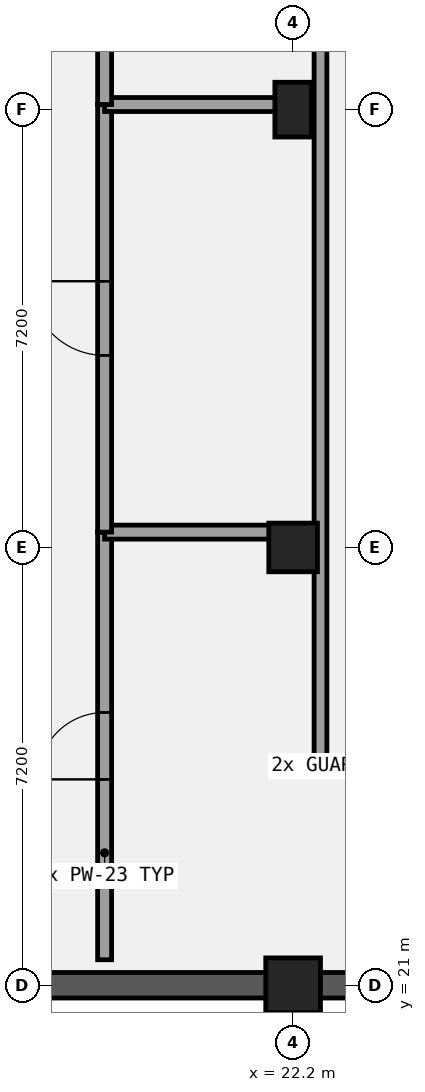
"""IFC4 building model, lengths in metres.
Left out: names, types, materials, properties, quantities, classifications, styles, units other than length and angle.
Written with IfcOpenShell. Run it as: python <this file> out.ifc"""

import sys

from ifc_helpers import new_model, si_unit, direction, frame, frame_2d, origin, origin_2d, place, context, subcontext, project, spatial, rectangle, extrude, element, fill, save


model = new_model("IFC4")
c1 = context("Model", 3, precision=1e-05, world=origin(), true_north=direction((0.0, 1.0)))
c2 = subcontext(c1, "Body", "Model", "MODEL_VIEW")
j1 = project(units=[si_unit("LENGTHUNIT", "METRE"), si_unit("PLANEANGLEUNIT", "RADIAN")], contexts=[c1])
p1 = place(None, origin())
s1 = spatial("IfcSite", under=j1, at=p1, CompositionType="ELEMENT")
p2 = place(p1, origin())
s2 = spatial("IfcBuilding", under=s1, at=p2, CompositionType="ELEMENT")
p3 = place(p2, frame((0.0, 0.0, -4.2)))
s3 = spatial("IfcBuildingStorey", under=s2, at=p3, CompositionType="ELEMENT", Elevation=-4.2)
p4 = place(p3, frame((29.61, 21.0, 0.0), z_axis=(0.0, 0.0, 1.0), x_axis=(-1.0, 0.0, 0.0)))
e1 = element("IfcWall", 1, at=p4, inside=s3, PredefinedType="USERDEFINED", context=c2, shape_type="SweptSolid", body=[
    extrude(rectangle(XDim=22.02, YDim=0.42, at=frame_2d((11.01, 0.0))), origin(), (0.0, 0.0, 1.0), 2.98),
])
p5 = place(p3, frame((22.2, 21.0, 0.0), z_axis=(0.0, 0.0, 1.0), x_axis=(1.0, 0.0, 0.0)))
e2 = element("IfcColumn", 2, at=p5, inside=s3, PredefinedType="COLUMN", context=c2, shape_type="SweptSolid", body=[
    extrude(rectangle(XDim=0.9, YDim=0.9, at=origin_2d()), origin(), (0.0, 0.0, 1.0), 4.2),
])
p6 = place(p3, frame((22.2, 28.2, 0.0), z_axis=(0.0, 0.0, 1.0), x_axis=(1.0, 0.0, 0.0)))
e3 = element("IfcColumn", 3, at=p6, inside=s3, PredefinedType="COLUMN", context=c2, shape_type="SweptSolid", body=[
    extrude(rectangle(XDim=0.8, YDim=0.8, at=origin_2d()), origin(), (0.0, 0.0, 1.0), 4.2),
])
p7 = place(p3, frame((22.2, 35.4, 0.0), z_axis=(0.0, 0.0, 1.0), x_axis=(1.0, 0.0, 0.0)))
e4 = element("IfcColumn", 4, at=p7, inside=s3, PredefinedType="COLUMN", context=c2, shape_type="SweptSolid", body=[
    extrude(rectangle(XDim=0.6, YDim=0.9, at=origin_2d()), origin(), (0.0, 0.0, 1.0), 4.2),
])
p8 = place(p3, frame((22.65, 24.6, 0.0), z_axis=(0.0, 0.0, 1.0), x_axis=(0.0, 1.0, 0.0)))
e5 = element("IfcWall", 5, at=p8, inside=s3, PredefinedType="PARTITIONING", context=c2, shape_type="SweptSolid", body=[
    extrude(rectangle(XDim=32.0, YDim=0.21, at=frame_2d((16.0, 0.0))), origin(), (0.0, 0.0, 1.0), 3.88),
])
p9 = place(p3, frame((19.1, 21.42, 0.0), z_axis=(0.0, 0.0, 1.0), x_axis=(0.0, 1.0, 0.0)))
e6 = element("IfcWall", 6, at=p9, inside=s3, PredefinedType="PARTITIONING", context=c2, shape_type="SweptSolid", body=[
    extrude(rectangle(XDim=7.032, YDim=0.23, at=frame_2d((3.516, 0.0))), origin(), (0.0, 0.0, 1.0), 3.88),
])
p10 = place(p9, frame((2.966, 0.0, 0.0)))
e7 = element("IfcOpeningElement", 7, at=p10, cuts=e6, PredefinedType="OPENING", context=c2, shape_type="SweptSolid", body=[
    extrude(rectangle(XDim=1.1, YDim=2.35, at=frame_2d((0.55, 1.175))), frame((0.0, 0.125, 0.0), z_axis=(0.0, -1.0, 0.0), x_axis=(1.0, 0.0, 0.0)), (0.0, 0.0, 1.0), 0.25),
])
p11 = place(p3, frame((19.1, 28.452, 0.0), z_axis=(0.0, 0.0, 1.0), x_axis=(1.0, 0.0, 0.0)))
e8 = element("IfcWall", 8, at=p11, inside=s3, PredefinedType="PARTITIONING", context=c2, shape_type="SweptSolid", body=[
    extrude(rectangle(XDim=3.1, YDim=0.23, at=frame_2d((1.55, 0.0))), origin(), (0.0, 0.0, 1.0), 2.98),
])
p12 = place(p3, frame((19.1, 28.452, 0.0), z_axis=(0.0, 0.0, 1.0), x_axis=(0.0, 1.0, 0.0)))
e9 = element("IfcWall", 9, at=p12, inside=s3, PredefinedType="PARTITIONING", context=c2, shape_type="SweptSolid", body=[
    extrude(rectangle(XDim=7.032, YDim=0.23, at=frame_2d((3.516, 0.0))), origin(), (0.0, 0.0, 1.0), 3.88),
])
p13 = place(p12, frame((2.906, 0.0, 0.0)))
e10 = element("IfcOpeningElement", 10, at=p13, cuts=e9, PredefinedType="OPENING", context=c2, shape_type="SweptSolid", body=[
    extrude(rectangle(XDim=1.22, YDim=2.1, at=frame_2d((0.61, 1.05))), frame((0.0, 0.125, 0.0), z_axis=(0.0, -1.0, 0.0), x_axis=(1.0, 0.0, 0.0)), (0.0, 0.0, 1.0), 0.25),
])
p14 = place(p3, frame((19.1, 35.484, 0.0), z_axis=(0.0, 0.0, 1.0), x_axis=(1.0, 0.0, 0.0)))
e11 = element("IfcWall", 11, at=p14, inside=s3, PredefinedType="PARTITIONING", context=c2, shape_type="SweptSolid", body=[
    extrude(rectangle(XDim=3.1, YDim=0.23, at=frame_2d((1.55, 0.0))), origin(), (0.0, 0.0, 1.0), 2.88),
])
p15 = place(p3, frame((19.1, 35.484, 0.0), z_axis=(0.0, 0.0, 1.0), x_axis=(0.0, 1.0, 0.0)))
e12 = element("IfcWall", 12, at=p15, inside=s3, PredefinedType="PARTITIONING", context=c2, shape_type="SweptSolid", body=[
    extrude(rectangle(XDim=7.032, YDim=0.23, at=frame_2d((3.516, 0.0))), origin(), (0.0, 0.0, 1.0), 3.88),
])
p16 = place(p15, frame((2.906, 0.0, 0.0)))
e13 = element("IfcOpeningElement", 13, at=p16, cuts=e12, PredefinedType="OPENING", context=c2, shape_type="SweptSolid", body=[
    extrude(rectangle(XDim=1.22, YDim=2.22, at=frame_2d((0.61, 1.11))), frame((0.0, 0.125, 0.0), z_axis=(0.0, -1.0, 0.0), x_axis=(1.0, 0.0, 0.0)), (0.0, 0.0, 1.0), 0.25),
])
p17 = place(p10, origin())
e14 = element("IfcDoor", 14, at=p17, inside=s3, OperationType="SINGLE_SWING_LEFT", PredefinedType="DOOR", context=c2, shape_type="SweptSolid", body=[
    extrude(rectangle(XDim=1.1, YDim=2.35, at=frame_2d((0.55, 1.175))), frame((0.0, 0.025, 0.0), z_axis=(0.0, -1.0, 0.0), x_axis=(1.0, 0.0, 0.0)), (0.0, 0.0, 1.0), 0.05),
])
fill(e7, e14)
p18 = place(p13, origin())
e15 = element("IfcDoor", 15, at=p18, inside=s3, OperationType="SINGLE_SWING_RIGHT", PredefinedType="DOOR", context=c2, shape_type="SweptSolid", body=[
    extrude(rectangle(XDim=1.22, YDim=2.1, at=frame_2d((0.61, 1.05))), frame((0.0, 0.025, 0.0), z_axis=(0.0, -1.0, 0.0), x_axis=(1.0, 0.0, 0.0)), (0.0, 0.0, 1.0), 0.05),
])
fill(e10, e15)
save(model, sys.argv[1])
